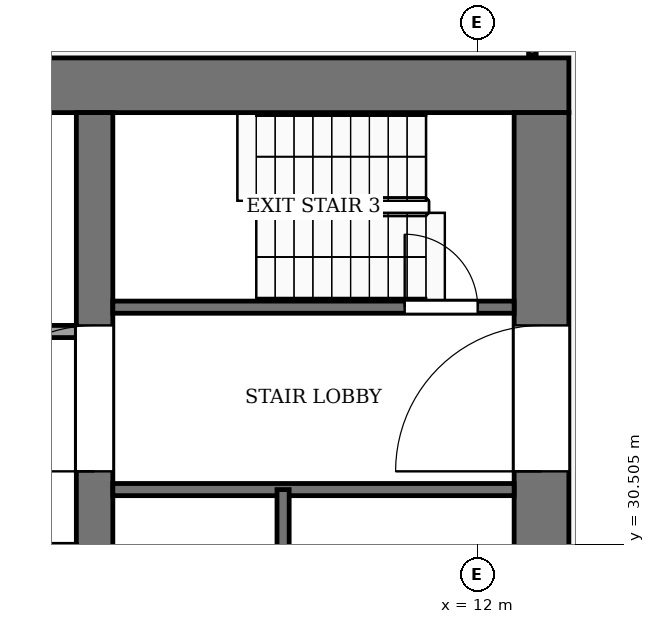
"""IFC4 building model, lengths in metres.
Left out: names, types, materials, properties, quantities, classifications, styles, units other than length and angle.
Written with IfcOpenShell. Run it as: python <this file> out.ifc"""

import sys

from ifc_helpers import new_model, si_unit, direction, frame, frame_2d, origin, place, context, subcontext, project, spatial, rectangle, extrude, element, fill, save


model = new_model("IFC4")
c1 = context("Model", 3, precision=1e-05, world=origin(), true_north=direction((0.0, 1.0)))
c2 = subcontext(c1, "Body", "Model", "MODEL_VIEW")
j1 = project(units=[si_unit("LENGTHUNIT", "METRE"), si_unit("PLANEANGLEUNIT", "RADIAN")], contexts=[c1])
p1 = place(None, origin())
s1 = spatial("IfcSite", under=j1, at=p1, CompositionType="ELEMENT")
p2 = place(p1, origin())
s2 = spatial("IfcBuilding", under=s1, at=p2, CompositionType="ELEMENT")
p3 = place(p2, frame((0.0, 0.0, 226.0)))
s3 = spatial("IfcBuildingStorey", under=s2, at=p3, CompositionType="ELEMENT", Elevation=226.0)
p4 = place(p3, frame((-13.5, 38.05, -0.25), z_axis=(0.0, 0.0, 1.0), x_axis=(1.0, 0.0, 0.0)))
e1 = element("IfcWall", 1, at=p4, inside=s3, PredefinedType="SHEAR", context=c2, shape_type="SweptSolid", body=[
    extrude(rectangle(XDim=27.0, YDim=0.9, at=frame_2d((13.5, 0.0))), origin(), (0.0, 0.0, 1.0), 7.12),
])
p5 = place(p3, frame((13.05, 18.4, -0.25), z_axis=(0.0, 0.0, 1.0), x_axis=(0.0, 1.0, 0.0)))
e2 = element("IfcWall", 2, at=p5, inside=s3, PredefinedType="SHEAR", context=c2, shape_type="SweptSolid", body=[
    extrude(rectangle(XDim=19.2, YDim=0.9, at=frame_2d((9.6, 0.0))), origin(), (0.0, 0.0, 1.0), 7.12),
])
p6 = place(p5, frame((2.8, 0.0, 0.25)))
e3 = element("IfcOpeningElement", 3, at=p6, cuts=e2, PredefinedType="OPENING", context=c2, shape_type="SweptSolid", body=[
    extrude(rectangle(XDim=2.4, YDim=2.4, at=frame_2d((1.2, 1.2))), frame((0.0, 0.46, 0.0), z_axis=(0.0, -1.0, 0.0), x_axis=(1.0, 0.0, 0.0)), (0.0, 0.0, 1.0), 0.92),
])
p7 = place(p5, frame((13.3, 0.0, 0.25)))
e4 = element("IfcOpeningElement", 4, at=p7, cuts=e2, PredefinedType="OPENING", context=c2, shape_type="SweptSolid", body=[
    extrude(rectangle(XDim=2.4, YDim=2.4, at=frame_2d((1.2, 1.2))), frame((0.0, 0.46, 0.0), z_axis=(0.0, -1.0, 0.0), x_axis=(1.0, 0.0, 0.0)), (0.0, 0.0, 1.0), 0.92),
])
p8 = place(p3, frame((5.7, 18.4, -0.25), z_axis=(0.0, 0.0, 1.0), x_axis=(0.0, 1.0, 0.0)))
e5 = element("IfcWall", 5, at=p8, inside=s3, PredefinedType="SHEAR", context=c2, shape_type="SweptSolid", body=[
    extrude(rectangle(XDim=19.2, YDim=0.6, at=frame_2d((9.6, 0.0))), origin(), (0.0, 0.0, 1.0), 7.12),
])
p9 = place(p8, frame((13.3, 0.0, 0.25)))
e6 = element("IfcOpeningElement", 6, at=p9, cuts=e5, PredefinedType="OPENING", context=c2, shape_type="SweptSolid", body=[
    extrude(rectangle(XDim=2.4, YDim=2.4, at=frame_2d((1.2, 1.2))), frame((0.0, 0.31, 0.0), z_axis=(0.0, -1.0, 0.0), x_axis=(1.0, 0.0, 0.0)), (0.0, 0.0, 1.0), 0.62),
])
p10 = place(p3, frame((6.0, 31.4, 0.0), z_axis=(0.0, 0.0, 1.0), x_axis=(1.0, 0.0, 0.0)))
e7 = element("IfcWall", 7, at=p10, inside=s3, PredefinedType="PARTITIONING", context=c2, shape_type="SweptSolid", body=[
    extrude(rectangle(XDim=6.6, YDim=0.2, at=frame_2d((3.3, 0.0))), origin(), (0.0, 0.0, 1.0), 6.87),
])
p11 = place(p3, frame((-5.4, 34.0, 0.0), z_axis=(0.0, 0.0, 1.0), x_axis=(1.0, 0.0, 0.0)))
e8 = element("IfcWall", 8, at=p11, inside=s3, PredefinedType="PARTITIONING", context=c2, shape_type="SweptSolid", body=[
    extrude(rectangle(XDim=10.8, YDim=0.2, at=frame_2d((5.4, 0.0))), origin(), (0.0, 0.0, 1.0), 6.87),
])
p12 = place(p11, frame((6.15, 0.0, 0.0)))
e9 = element("IfcOpeningElement", 9, at=p12, cuts=e8, PredefinedType="OPENING", context=c2, shape_type="SweptSolid", body=[
    extrude(rectangle(XDim=1.2, YDim=2.2, at=frame_2d((0.6, 1.1))), frame((0.0, 0.11, 0.0), z_axis=(0.0, -1.0, 0.0), x_axis=(1.0, 0.0, 0.0)), (0.0, 0.0, 1.0), 0.22),
])
p13 = place(p11, frame((8.95, 0.0, 0.0)))
e10 = element("IfcOpeningElement", 10, at=p13, cuts=e8, PredefinedType="OPENING", context=c2, shape_type="SweptSolid", body=[
    extrude(rectangle(XDim=1.0, YDim=2.1, at=frame_2d((0.5, 1.05))), frame((0.0, 0.11, 0.0), z_axis=(0.0, -1.0, 0.0), x_axis=(1.0, 0.0, 0.0)), (0.0, 0.0, 1.0), 0.22),
])
p14 = place(p3, frame((6.0, 34.4, 0.0), z_axis=(0.0, 0.0, 1.0), x_axis=(1.0, 0.0, 0.0)))
e11 = element("IfcWall", 11, at=p14, inside=s3, PredefinedType="PARTITIONING", context=c2, shape_type="SweptSolid", body=[
    extrude(rectangle(XDim=6.6, YDim=0.2, at=frame_2d((3.3, 0.0))), origin(), (0.0, 0.0, 1.0), 6.87),
])
p15 = place(p14, frame((4.8, 0.0, 0.0)))
e12 = element("IfcOpeningElement", 12, at=p15, cuts=e11, PredefinedType="OPENING", context=c2, shape_type="SweptSolid", body=[
    extrude(rectangle(XDim=1.2, YDim=2.2, at=frame_2d((0.6, 1.1))), frame((0.0, 0.11, 0.0), z_axis=(0.0, -1.0, 0.0), x_axis=(1.0, 0.0, 0.0)), (0.0, 0.0, 1.0), 0.22),
])
p16 = place(p3, frame((8.8, 24.0, 0.0), z_axis=(0.0, 0.0, 1.0), x_axis=(0.0, 1.0, 0.0)))
e13 = element("IfcWall", 13, at=p16, inside=s3, PredefinedType="PARTITIONING", context=c2, shape_type="SweptSolid", body=[
    extrude(rectangle(XDim=7.4, YDim=0.2, at=frame_2d((3.7, 0.0))), origin(), (0.0, 0.0, 1.0), 6.87),
])
p17 = place(p3, frame((12.9, 38.55, 0.0), z_axis=(0.0, 0.0, 1.0), x_axis=(0.0, 1.0, 0.0)))
e14 = element("IfcWall", 14, at=p17, inside=s3, PredefinedType="PARTITIONING", context=c2, shape_type="SweptSolid", body=[
    extrude(rectangle(XDim=28.358, YDim=0.125, at=frame_2d((14.179, 0.0))), origin(), (0.0, 0.0, 1.0), 6.24),
])
p18 = place(p15, origin())
e15 = element("IfcDoor", 15, at=p18, inside=s3, OperationType="SINGLE_SWING_LEFT", PredefinedType="DOOR", context=c2, shape_type="SweptSolid", body=[
    extrude(rectangle(XDim=1.2, YDim=2.2, at=frame_2d((0.6, 1.1))), frame((0.0, 0.025, 0.0), z_axis=(0.0, -1.0, 0.0), x_axis=(1.0, 0.0, 0.0)), (0.0, 0.0, 1.0), 0.05),
])
fill(e12, e15)
p19 = place(p9, origin())
e16 = element("IfcDoor", 16, at=p19, inside=s3, OperationType="DOUBLE_DOOR_SINGLE_SWING", PredefinedType="DOOR", context=c2, shape_type="SweptSolid", body=[
    extrude(rectangle(XDim=2.4, YDim=2.4, at=frame_2d((1.2, 1.2))), frame((0.0, 0.025, 0.0), z_axis=(0.0, -1.0, 0.0), x_axis=(1.0, 0.0, 0.0)), (0.0, 0.0, 1.0), 0.05),
])
fill(e6, e16)
p20 = place(p7, origin())
e17 = element("IfcDoor", 17, at=p20, inside=s3, OperationType="DOUBLE_DOOR_SINGLE_SWING", PredefinedType="DOOR", context=c2, shape_type="SweptSolid", body=[
    extrude(rectangle(XDim=2.4, YDim=2.4, at=frame_2d((1.2, 1.2))), frame((0.0, 0.025, 0.0), z_axis=(0.0, -1.0, 0.0), x_axis=(1.0, 0.0, 0.0)), (0.0, 0.0, 1.0), 0.05),
])
fill(e4, e17)
save(model, sys.argv[1])
